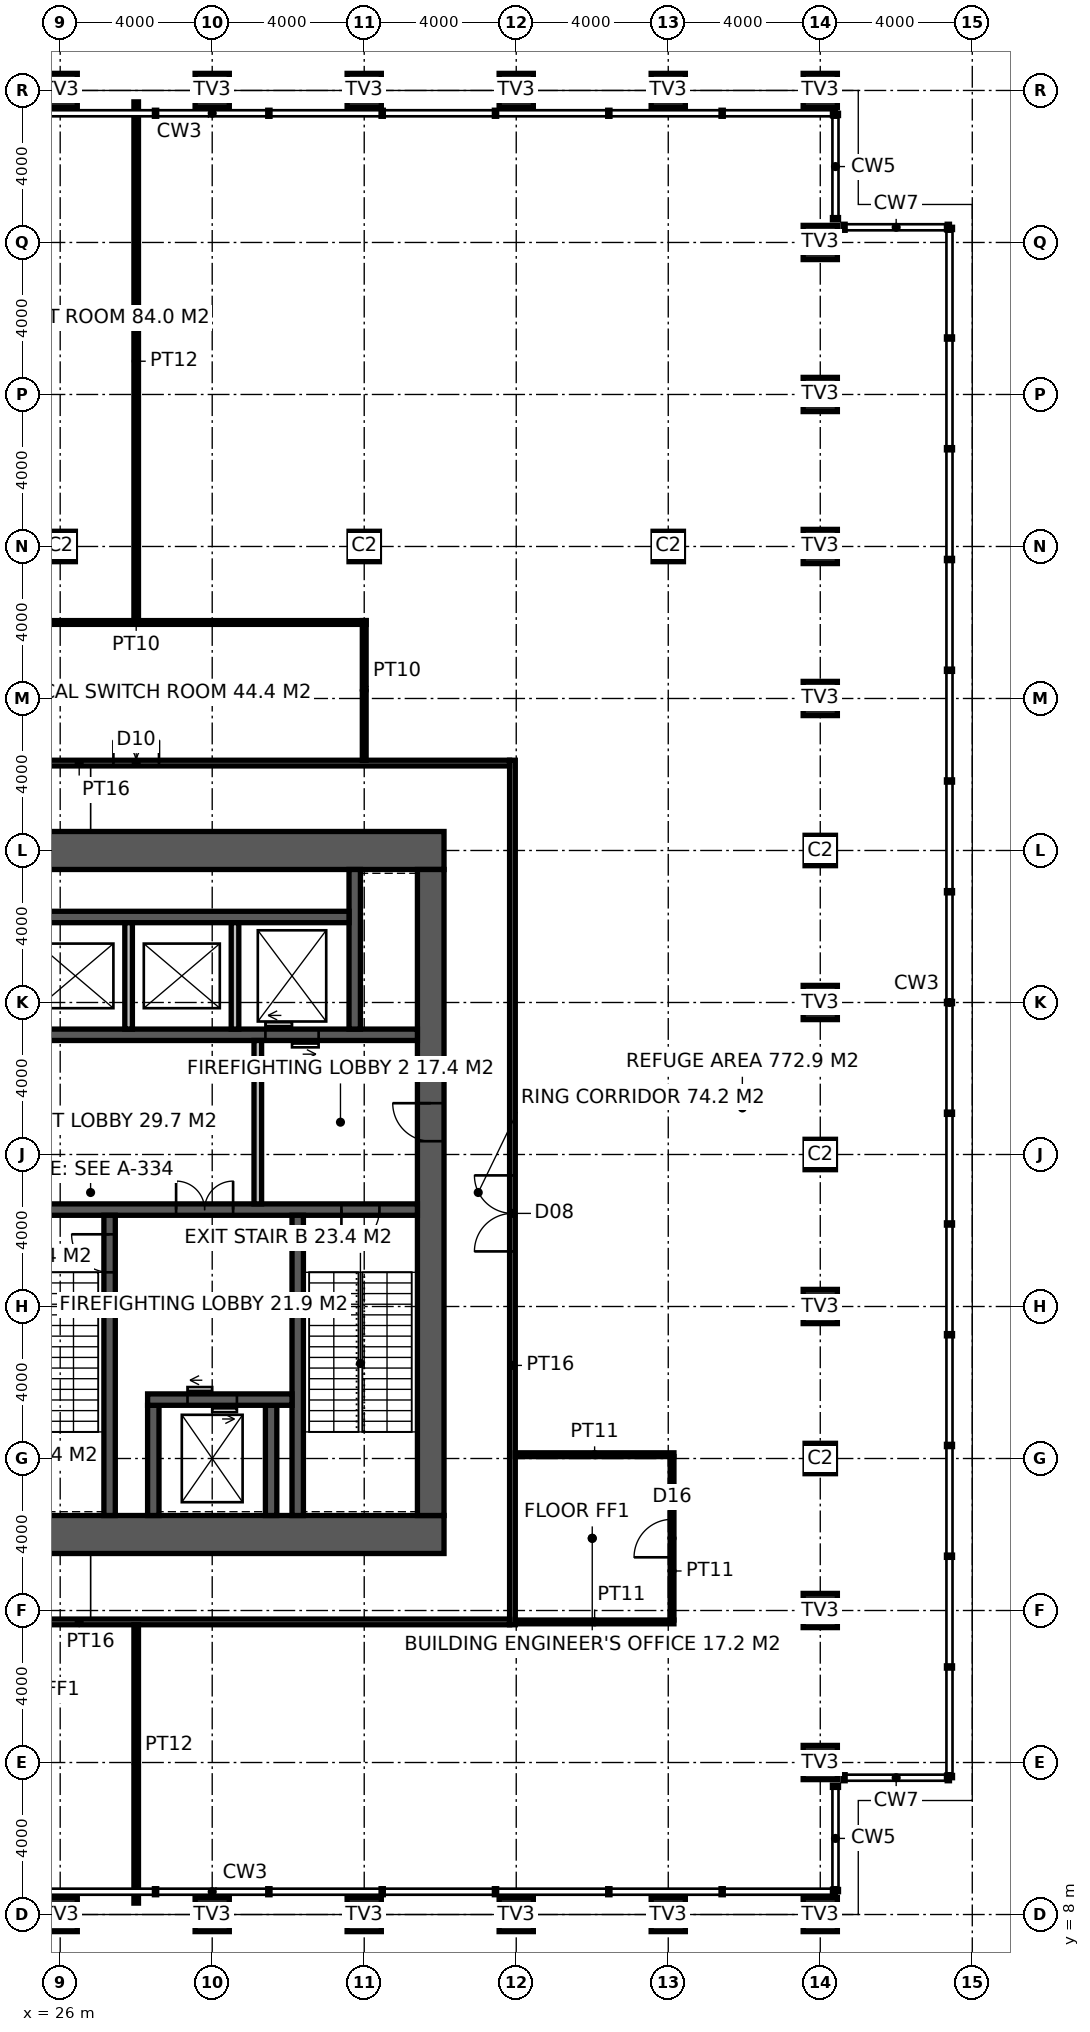
"""IFC4 building model, lengths in metres.
Left out: names, types, materials, properties, quantities, classifications, styles, units other than length and angle.
Written with IfcOpenShell. Run it as: python <this file> out.ifc"""

import sys

from ifc_helpers import new_model, si_unit, direction, frame, frame_2d, origin, origin_2d, place, context, subcontext, project, spatial, rectangle, hollow_rectangle, extrude, element, fill, save


model = new_model("IFC4")
c1 = context("Model", 3, precision=1e-05, world=origin(), true_north=direction((0.0, 1.0)))
c2 = subcontext(c1, "Body", "Model", "MODEL_VIEW")
j1 = project(units=[si_unit("LENGTHUNIT", "METRE"), si_unit("PLANEANGLEUNIT", "RADIAN")], contexts=[c1])
p1 = place(None, origin())
s1 = spatial("IfcSite", under=j1, at=p1, CompositionType="ELEMENT")
p2 = place(p1, origin())
s2 = spatial("IfcBuilding", under=s1, at=p2, CompositionType="ELEMENT")
p3 = place(p2, frame((0.0, 0.0, 203.8)))
s3 = spatial("IfcBuildingStorey", under=s2, at=p3, CompositionType="ELEMENT", Elevation=203.8)
for number, where, z_axis, x_axis in (
    (1, (26.0, 8.0, 0.0), (0.0, 0.0, 1.0), (1.0, 0.0, 0.0)),
    (2, (26.0, 56.0, 0.0), (0.0, 0.0, 1.0), (1.0, 0.0, 0.0)),
    (3, (30.0, 8.0, 0.0), (0.0, 0.0, 1.0), (1.0, 0.0, 0.0)),
    (4, (30.0, 56.0, 0.0), (0.0, 0.0, 1.0), (1.0, 0.0, 0.0)),
    (5, (34.0, 8.0, 0.0), (0.0, 0.0, 1.0), (1.0, 0.0, 0.0)),
    (6, (34.0, 56.0, 0.0), (0.0, 0.0, 1.0), (1.0, 0.0, 0.0)),
    (7, (38.0, 8.0, 0.0), (0.0, 0.0, 1.0), (1.0, 0.0, 0.0)),
    (8, (38.0, 56.0, 0.0), (0.0, 0.0, 1.0), (1.0, 0.0, 0.0)),
    (9, (42.0, 8.0, 0.0), (0.0, 0.0, 1.0), (1.0, 0.0, 0.0)),
    (10, (42.0, 56.0, 0.0), (0.0, 0.0, 1.0), (1.0, 0.0, 0.0)),
    (11, (46.0, 8.0, 0.0), (0.0, 0.0, 1.0), (1.0, 0.0, 0.0)),
    (12, (46.0, 56.0, 0.0), (0.0, 0.0, 1.0), (1.0, 0.0, 0.0)),
    (13, (46.0, 12.0, 0.0), (0.0, 0.0, 1.0), (1.0, 0.0, 0.0)),
    (14, (46.0, 16.0, 0.0), (0.0, 0.0, 1.0), (1.0, 0.0, 0.0)),
    (15, (46.0, 24.0, 0.0), (0.0, 0.0, 1.0), (1.0, 0.0, 0.0)),
    (16, (46.0, 32.0, 0.0), (0.0, 0.0, 1.0), (1.0, 0.0, 0.0)),
    (17, (46.0, 40.0, 0.0), (0.0, 0.0, 1.0), (1.0, 0.0, 0.0)),
    (18, (46.0, 44.0, 0.0), (0.0, 0.0, 1.0), (1.0, 0.0, 0.0)),
    (19, (46.0, 48.0, 0.0), (0.0, 0.0, 1.0), (1.0, 0.0, 0.0)),
    (20, (46.0, 52.0, 0.0), (0.0, 0.0, 1.0), (1.0, 0.0, 0.0)),
):
    element("IfcColumn", number, at=place(p3, frame(where, z_axis=z_axis, x_axis=x_axis)), inside=s3, PredefinedType="USERDEFINED", context=c2, shape_type="SweptSolid", body=[
        extrude(hollow_rectangle(XDim=0.9, YDim=0.9, WallThickness=0.08, at=origin_2d()), origin(), (0.0, 0.0, 1.0), 5.4),
    ])
for number, where, z_axis, x_axis in (
    (21, (26.0, 44.0, 0.0), (0.0, 0.0, 1.0), (1.0, 0.0, 0.0)),
    (22, (34.0, 44.0, 0.0), (0.0, 0.0, 1.0), (1.0, 0.0, 0.0)),
    (23, (42.0, 44.0, 0.0), (0.0, 0.0, 1.0), (1.0, 0.0, 0.0)),
    (24, (46.0, 20.0, 0.0), (0.0, 0.0, 1.0), (1.0, 0.0, 0.0)),
    (25, (46.0, 28.0, 0.0), (0.0, 0.0, 1.0), (1.0, 0.0, 0.0)),
    (26, (46.0, 36.0, 0.0), (0.0, 0.0, 1.0), (1.0, 0.0, 0.0)),
):
    element("IfcColumn", number, at=place(p3, frame(where, z_axis=z_axis, x_axis=x_axis)), inside=s3, PredefinedType="COLUMN", context=c2, shape_type="SweptSolid", body=[
        extrude(hollow_rectangle(XDim=0.8, YDim=0.8, WallThickness=0.08, at=origin_2d()), origin(), (0.0, 0.0, 1.0), 5.4),
    ])
p4 = place(p3, frame((18.5, 18.0, -0.15), z_axis=(0.0, 0.0, 1.0), x_axis=(1.0, 0.0, 0.0)))
e27 = element("IfcWall", 27, at=p4, inside=s3, PredefinedType="SHEAR", context=c2, shape_type="SweptSolid", body=[
    extrude(rectangle(XDim=17.6, YDim=1.0, at=frame_2d((8.8, 0.0))), origin(), (0.0, 0.0, 1.0), 5.4),
])
p5 = place(p4, frame((3.45, 0.0, 0.15)))
e28 = element("IfcOpeningElement", 28, at=p5, cuts=e27, PredefinedType="OPENING", context=c2, shape_type="SweptSolid", body=[
    extrude(rectangle(XDim=1.5, YDim=2.4, at=frame_2d((0.75, 1.2))), frame((0.0, 0.51, 0.0), z_axis=(0.0, -1.0, 0.0), x_axis=(1.0, 0.0, 0.0)), (0.0, 0.0, 1.0), 1.02),
])
p6 = place(p3, frame((18.5, 36.0, -0.15), z_axis=(0.0, 0.0, 1.0), x_axis=(1.0, 0.0, 0.0)))
e29 = element("IfcWall", 29, at=p6, inside=s3, PredefinedType="SHEAR", context=c2, shape_type="SweptSolid", body=[
    extrude(rectangle(XDim=17.6, YDim=1.0, at=frame_2d((8.8, 0.0))), origin(), (0.0, 0.0, 1.0), 5.4),
])
p7 = place(p3, frame((35.75, 18.5, -0.15), z_axis=(0.0, 0.0, 1.0), x_axis=(0.0, 1.0, 0.0)))
e30 = element("IfcWall", 30, at=p7, inside=s3, PredefinedType="SHEAR", context=c2, shape_type="SweptSolid", body=[
    extrude(rectangle(XDim=17.0, YDim=0.7, at=frame_2d((8.5, 0.0))), origin(), (0.0, 0.0, 1.0), 5.4),
])
p8 = place(p7, frame((9.85, 0.0, 0.15)))
e31 = element("IfcOpeningElement", 31, at=p8, cuts=e30, PredefinedType="OPENING", context=c2, shape_type="SweptSolid", body=[
    extrude(rectangle(XDim=1.0, YDim=2.2, at=frame_2d((0.5, 1.1))), frame((0.0, 0.36, 0.0), z_axis=(0.0, -1.0, 0.0), x_axis=(1.0, 0.0, 0.0)), (0.0, 0.0, 1.0), 0.72),
])
p9 = place(p3, frame((24.15, 26.55, -0.15), z_axis=(0.0, 0.0, 1.0), x_axis=(1.0, 0.0, 0.0)))
e32 = element("IfcWall", 32, at=p9, inside=s3, PredefinedType="SHEAR", context=c2, shape_type="SweptSolid", body=[
    extrude(rectangle(XDim=11.25, YDim=0.3, at=frame_2d((5.625, 0.0))), origin(), (0.0, 0.0, 1.0), 5.4),
])
p10 = place(p9, frame((9.25, 0.0, 0.15)))
e33 = element("IfcOpeningElement", 33, at=p10, cuts=e32, PredefinedType="OPENING", context=c2, shape_type="SweptSolid", body=[
    extrude(rectangle(XDim=1.0, YDim=2.2, at=frame_2d((0.5, 1.1))), frame((0.0, 0.16, 0.0), z_axis=(0.0, -1.0, 0.0), x_axis=(1.0, 0.0, 0.0)), (0.0, 0.0, 1.0), 0.32),
])
p11 = place(p9, frame((4.9, 0.0, 0.15)))
e34 = element("IfcOpeningElement", 34, at=p11, cuts=e32, PredefinedType="OPENING", context=c2, shape_type="SweptSolid", body=[
    extrude(rectangle(XDim=1.5, YDim=2.4, at=frame_2d((0.75, 1.2))), frame((0.0, 0.16, 0.0), z_axis=(0.0, -1.0, 0.0), x_axis=(1.0, 0.0, 0.0)), (0.0, 0.0, 1.0), 0.32),
])
p12 = place(p3, frame((27.3, 18.5, -0.15), z_axis=(0.0, 0.0, 1.0), x_axis=(0.0, 1.0, 0.0)))
e35 = element("IfcWall", 35, at=p12, inside=s3, PredefinedType="SHEAR", context=c2, shape_type="SweptSolid", body=[
    extrude(rectangle(XDim=7.9, YDim=0.3, at=frame_2d((3.95, 0.0))), origin(), (0.0, 0.0, 1.0), 5.4),
])
p13 = place(p12, frame((6.4, 0.0, 0.15)))
e36 = element("IfcOpeningElement", 36, at=p13, cuts=e35, PredefinedType="OPENING", context=c2, shape_type="SweptSolid", body=[
    extrude(rectangle(XDim=1.0, YDim=2.2, at=frame_2d((0.5, 1.1))), frame((0.0, 0.16, 0.0), z_axis=(0.0, -1.0, 0.0), x_axis=(1.0, 0.0, 0.0)), (0.0, 0.0, 1.0), 0.32),
])
p14 = place(p3, frame((32.25, 18.5, -0.15), z_axis=(0.0, 0.0, 1.0), x_axis=(0.0, 1.0, 0.0)))
e37 = element("IfcWall", 37, at=p14, inside=s3, PredefinedType="SHEAR", context=c2, shape_type="SweptSolid", body=[
    extrude(rectangle(XDim=7.9, YDim=0.3, at=frame_2d((3.95, 0.0))), origin(), (0.0, 0.0, 1.0), 5.4),
])
for number, where, z_axis, x_axis in (
    (38, (28.45, 18.5, -0.15), (0.0, 0.0, 1.0), (0.0, 1.0, 0.0)),
    (39, (31.55, 18.5, -0.15), (0.0, 0.0, 1.0), (0.0, 1.0, 0.0)),
):
    element("IfcWall", number, at=place(p3, frame(where, z_axis=z_axis, x_axis=x_axis)), inside=s3, PredefinedType="SHEAR", context=c2, shape_type="SweptSolid", body=[
        extrude(rectangle(XDim=2.9, YDim=0.3, at=frame_2d((1.45, 0.0))), origin(), (0.0, 0.0, 1.0), 5.4),
    ])
p15 = place(p3, frame((28.3, 21.55, -0.15), z_axis=(0.0, 0.0, 1.0), x_axis=(1.0, 0.0, 0.0)))
e40 = element("IfcWall", 40, at=p15, inside=s3, PredefinedType="SHEAR", context=c2, shape_type="SweptSolid", body=[
    extrude(rectangle(XDim=3.8, YDim=0.3, at=frame_2d((1.9, 0.0))), origin(), (0.0, 0.0, 1.0), 5.4),
])
p16 = place(p15, frame((1.05, 0.0, 0.15)))
e41 = element("IfcOpeningElement", 41, at=p16, cuts=e40, PredefinedType="OPENING", context=c2, shape_type="SweptSolid", body=[
    extrude(rectangle(XDim=1.3, YDim=2.4, at=frame_2d((0.65, 1.2))), frame((0.0, 0.16, 0.0), z_axis=(0.0, -1.0, 0.0), x_axis=(1.0, 0.0, 0.0)), (0.0, 0.0, 1.0), 0.32),
])
p17 = place(p3, frame((24.15, 31.15, -0.15), z_axis=(0.0, 0.0, 1.0), x_axis=(1.0, 0.0, 0.0)))
e42 = element("IfcWall", 42, at=p17, inside=s3, PredefinedType="SHEAR", context=c2, shape_type="SweptSolid", body=[
    extrude(rectangle(XDim=11.25, YDim=0.3, at=frame_2d((5.625, 0.0))), origin(), (0.0, 0.0, 1.0), 5.4),
])
p18 = place(p17, frame((7.25, 0.0, 0.15)))
e43 = element("IfcOpeningElement", 43, at=p18, cuts=e42, PredefinedType="OPENING", context=c2, shape_type="SweptSolid", body=[
    extrude(rectangle(XDim=1.4, YDim=2.4, at=frame_2d((0.7, 1.2))), frame((0.0, 0.16, 0.0), z_axis=(0.0, -1.0, 0.0), x_axis=(1.0, 0.0, 0.0)), (0.0, 0.0, 1.0), 0.32),
])
p19 = place(p3, frame((33.75, 31.3, -0.15), z_axis=(0.0, 0.0, 1.0), x_axis=(0.0, 1.0, 0.0)))
e44 = element("IfcWall", 44, at=p19, inside=s3, PredefinedType="SHEAR", context=c2, shape_type="SweptSolid", body=[
    extrude(rectangle(XDim=4.2, YDim=0.3, at=frame_2d((2.1, 0.0))), origin(), (0.0, 0.0, 1.0), 5.4),
])
p20 = place(p3, frame((25.0, 34.25, -0.15), z_axis=(0.0, 0.0, 1.0), x_axis=(1.0, 0.0, 0.0)))
e45 = element("IfcWall", 45, at=p20, inside=s3, PredefinedType="SHEAR", context=c2, shape_type="SweptSolid", body=[
    extrude(rectangle(XDim=8.6, YDim=0.3, at=frame_2d((4.3, 0.0))), origin(), (0.0, 0.0, 1.0), 5.4),
])
for number, where, z_axis, x_axis in (
    (46, (27.8, 31.3, -0.15), (0.0, 0.0, 1.0), (0.0, 1.0, 0.0)),
    (47, (30.6, 31.3, -0.15), (0.0, 0.0, 1.0), (0.0, 1.0, 0.0)),
):
    element("IfcWall", number, at=place(p3, frame(where, z_axis=z_axis, x_axis=x_axis)), inside=s3, PredefinedType="SOLIDWALL", context=c2, shape_type="SweptSolid", body=[
        extrude(rectangle(XDim=2.8, YDim=0.2, at=frame_2d((1.4, 0.0))), origin(), (0.0, 0.0, 1.0), 5.4),
    ])
p21 = place(p3, frame((31.2, 26.7, 0.0), z_axis=(0.0, 0.0, 1.0), x_axis=(0.0, 1.0, 0.0)))
e48 = element("IfcWall", 48, at=p21, inside=s3, PredefinedType="SOLIDWALL", context=c2, shape_type="SweptSolid", body=[
    extrude(rectangle(XDim=4.3, YDim=0.2, at=frame_2d((2.15, 0.0))), origin(), (0.0, 0.0, 1.0), 5.25),
])
p22 = place(p3, frame((37.9, 15.625, 0.0), z_axis=(0.0, 0.0, 1.0), x_axis=(0.0, 1.0, 0.0)))
e49 = element("IfcWall", 49, at=p22, inside=s3, PredefinedType="PARTITIONING", context=c2, shape_type="SweptSolid", body=[
    extrude(rectangle(XDim=22.75, YDim=0.15, at=frame_2d((11.375, 0.0))), origin(), (0.0, 0.0, 1.0), 4.25),
])
p23 = place(p22, frame((9.825, 0.0, 0.0)))
e50 = element("IfcOpeningElement", 50, at=p23, cuts=e49, PredefinedType="OPENING", context=c2, shape_type="SweptSolid", body=[
    extrude(rectangle(XDim=2.0, YDim=2.4, at=frame_2d((1.0, 1.2))), frame((0.0, 0.085, 0.0), z_axis=(0.0, -1.0, 0.0), x_axis=(1.0, 0.0, 0.0)), (0.0, 0.0, 1.0), 0.17),
])
p24 = place(p3, frame((15.175, 15.7, 0.0), z_axis=(0.0, 0.0, 1.0), x_axis=(1.0, 0.0, 0.0)))
e51 = element("IfcWall", 51, at=p24, inside=s3, PredefinedType="PARTITIONING", context=c2, shape_type="SweptSolid", body=[
    extrude(rectangle(XDim=22.65, YDim=0.15, at=frame_2d((11.325, 0.0))), origin(), (0.0, 0.0, 1.0), 5.25),
])
p25 = place(p3, frame((15.175, 38.3, 0.0), z_axis=(0.0, 0.0, 1.0), x_axis=(1.0, 0.0, 0.0)))
e52 = element("IfcWall", 52, at=p25, inside=s3, PredefinedType="PARTITIONING", context=c2, shape_type="SweptSolid", body=[
    extrude(rectangle(XDim=22.65, YDim=0.15, at=frame_2d((11.325, 0.0))), origin(), (0.0, 0.0, 1.0), 5.25),
])
p26 = place(p25, frame((12.225, 0.0, 0.0)))
e53 = element("IfcOpeningElement", 53, at=p26, cuts=e52, PredefinedType="OPENING", context=c2, shape_type="SweptSolid", body=[
    extrude(rectangle(XDim=1.2, YDim=2.2, at=frame_2d((0.6, 1.1))), frame((0.0, 0.085, 0.0), z_axis=(0.0, -1.0, 0.0), x_axis=(1.0, 0.0, 0.0)), (0.0, 0.0, 1.0), 0.17),
])
p27 = place(p3, frame((34.0, 38.375, 0.0), z_axis=(0.0, 0.0, 1.0), x_axis=(0.0, 1.0, 0.0)))
e54 = element("IfcWall", 54, at=p27, inside=s3, PredefinedType="PARTITIONING", context=c2, shape_type="SweptSolid", body=[
    extrude(rectangle(XDim=3.675, YDim=0.1, at=frame_2d((1.837, 0.0))), origin(), (0.0, 0.0, 1.0), 4.25),
])
p28 = place(p3, frame((21.95, 42.0, 0.0), z_axis=(0.0, 0.0, 1.0), x_axis=(1.0, 0.0, 0.0)))
e55 = element("IfcWall", 55, at=p28, inside=s3, PredefinedType="PARTITIONING", context=c2, shape_type="SweptSolid", body=[
    extrude(rectangle(XDim=12.1, YDim=0.1, at=frame_2d((6.05, 0.0))), origin(), (0.0, 0.0, 1.0), 5.25),
])
p29 = place(p3, frame((28.0, 8.3, 0.0), z_axis=(0.0, 0.0, 1.0), x_axis=(0.0, 1.0, 0.0)))
e56 = element("IfcWall", 56, at=p29, inside=s3, PredefinedType="PARTITIONING", context=c2, shape_type="SweptSolid", body=[
    extrude(rectangle(XDim=7.325, YDim=0.12, at=frame_2d((3.663, 0.0))), origin(), (0.0, 0.0, 1.0), 5.25),
])
p30 = place(p3, frame((28.0, 42.05, 0.0), z_axis=(0.0, 0.0, 1.0), x_axis=(0.0, 1.0, 0.0)))
e57 = element("IfcWall", 57, at=p30, inside=s3, PredefinedType="PARTITIONING", context=c2, shape_type="SweptSolid", body=[
    extrude(rectangle(XDim=13.65, YDim=0.12, at=frame_2d((6.825, 0.0))), origin(), (0.0, 0.0, 1.0), 5.25),
])
p31 = place(p3, frame((37.975, 15.7, 0.0), z_axis=(0.0, 0.0, 1.0), x_axis=(1.0, 0.0, 0.0)))
e58 = element("IfcWall", 58, at=p31, inside=s3, PredefinedType="PARTITIONING", context=c2, shape_type="SweptSolid", body=[
    extrude(rectangle(XDim=4.175, YDim=0.1, at=frame_2d((2.087, 0.0))), origin(), (0.0, 0.0, 1.0), 5.25),
])
p32 = place(p3, frame((37.975, 20.1, 0.0), z_axis=(0.0, 0.0, 1.0), x_axis=(1.0, 0.0, 0.0)))
e59 = element("IfcWall", 59, at=p32, inside=s3, PredefinedType="PARTITIONING", context=c2, shape_type="SweptSolid", body=[
    extrude(rectangle(XDim=4.175, YDim=0.1, at=frame_2d((2.087, 0.0))), origin(), (0.0, 0.0, 1.0), 4.35),
])
p33 = place(p3, frame((42.1, 15.75, 0.0), z_axis=(0.0, 0.0, 1.0), x_axis=(0.0, 1.0, 0.0)))
e60 = element("IfcWall", 60, at=p33, inside=s3, PredefinedType="PARTITIONING", context=c2, shape_type="SweptSolid", body=[
    extrude(rectangle(XDim=4.3, YDim=0.1, at=frame_2d((2.15, 0.0))), origin(), (0.0, 0.0, 1.0), 4.35),
])
p34 = place(p33, frame((1.65, 0.0, 0.0)))
e61 = element("IfcOpeningElement", 61, at=p34, cuts=e60, PredefinedType="OPENING", context=c2, shape_type="SweptSolid", body=[
    extrude(rectangle(XDim=1.0, YDim=2.2, at=frame_2d((0.5, 1.1))), frame((0.0, 0.06, 0.0), z_axis=(0.0, -1.0, 0.0), x_axis=(1.0, 0.0, 0.0)), (0.0, 0.0, 1.0), 0.12),
])
p35 = place(p13, origin())
e62 = element("IfcDoor", 62, at=p35, inside=s3, OperationType="SINGLE_SWING_RIGHT", PredefinedType="DOOR", context=c2, shape_type="SweptSolid", body=[
    extrude(rectangle(XDim=1.0, YDim=2.2, at=frame_2d((0.5, 1.1))), frame((0.0, 0.025, 0.0), z_axis=(0.0, -1.0, 0.0), x_axis=(1.0, 0.0, 0.0)), (0.0, 0.0, 1.0), 0.05),
])
fill(e36, e62)
p36 = place(p10, frame((1.0, 0.0, 0.0), z_axis=(0.0, 0.0, 1.0), x_axis=(-1.0, 0.0, 0.0)))
e63 = element("IfcDoor", 63, at=p36, inside=s3, OperationType="SINGLE_SWING_RIGHT", PredefinedType="DOOR", context=c2, shape_type="SweptSolid", body=[
    extrude(rectangle(XDim=1.0, YDim=2.2, at=frame_2d((0.5, 1.1))), frame((0.0, 0.025, 0.0), z_axis=(0.0, -1.0, 0.0), x_axis=(1.0, 0.0, 0.0)), (0.0, 0.0, 1.0), 0.05),
])
fill(e33, e63)
p37 = place(p8, origin())
e64 = element("IfcDoor", 64, at=p37, inside=s3, OperationType="SINGLE_SWING_RIGHT", PredefinedType="DOOR", context=c2, shape_type="SweptSolid", body=[
    extrude(rectangle(XDim=1.0, YDim=2.2, at=frame_2d((0.5, 1.1))), frame((0.0, 0.025, 0.0), z_axis=(0.0, -1.0, 0.0), x_axis=(1.0, 0.0, 0.0)), (0.0, 0.0, 1.0), 0.05),
])
fill(e31, e64)
p38 = place(p11, origin())
e65 = element("IfcDoor", 65, at=p38, inside=s3, OperationType="DOUBLE_DOOR_DOUBLE_SWING", PredefinedType="DOOR", context=c2, shape_type="SweptSolid", body=[
    extrude(rectangle(XDim=1.5, YDim=2.4, at=frame_2d((0.75, 1.2))), frame((0.0, 0.025, 0.0), z_axis=(0.0, -1.0, 0.0), x_axis=(1.0, 0.0, 0.0)), (0.0, 0.0, 1.0), 0.05),
])
fill(e34, e65)
p39 = place(p26, origin())
e66 = element("IfcDoor", 66, at=p39, inside=s3, OperationType="DOUBLE_DOOR_DOUBLE_SWING", PredefinedType="DOOR", context=c2, shape_type="SweptSolid", body=[
    extrude(rectangle(XDim=1.2, YDim=2.2, at=frame_2d((0.6, 1.1))), frame((0.0, 0.025, 0.0), z_axis=(0.0, -1.0, 0.0), x_axis=(1.0, 0.0, 0.0)), (0.0, 0.0, 1.0), 0.05),
])
fill(e53, e66)
p40 = place(p23, origin())
e67 = element("IfcDoor", 67, at=p40, inside=s3, OperationType="DOUBLE_DOOR_DOUBLE_SWING", PredefinedType="DOOR", context=c2, shape_type="SweptSolid", body=[
    extrude(rectangle(XDim=2.0, YDim=2.4, at=frame_2d((1.0, 1.2))), frame((0.0, 0.025, 0.0), z_axis=(0.0, -1.0, 0.0), x_axis=(1.0, 0.0, 0.0)), (0.0, 0.0, 1.0), 0.05),
])
fill(e50, e67)
p41 = place(p34, origin())
e68 = element("IfcDoor", 68, at=p41, inside=s3, OperationType="SINGLE_SWING_LEFT", PredefinedType="DOOR", context=c2, shape_type="SweptSolid", body=[
    extrude(rectangle(XDim=1.0, YDim=2.2, at=frame_2d((0.5, 1.1))), frame((0.0, 0.025, 0.0), z_axis=(0.0, -1.0, 0.0), x_axis=(1.0, 0.0, 0.0)), (0.0, 0.0, 1.0), 0.05),
])
fill(e61, e68)
p42 = place(p16, origin())
e69 = element("IfcDoor", 69, at=p42, inside=s3, OperationType="DOUBLE_DOOR_SLIDING", PredefinedType="DOOR", context=c2, shape_type="SweptSolid", body=[
    extrude(rectangle(XDim=1.3, YDim=2.4, at=frame_2d((0.65, 1.2))), frame((0.0, 0.025, 0.0), z_axis=(0.0, -1.0, 0.0), x_axis=(1.0, 0.0, 0.0)), (0.0, 0.0, 1.0), 0.05),
])
fill(e41, e69)
p43 = place(p18, origin())
e70 = element("IfcDoor", 70, at=p43, inside=s3, OperationType="DOUBLE_DOOR_SLIDING", PredefinedType="DOOR", context=c2, shape_type="SweptSolid", body=[
    extrude(rectangle(XDim=1.4, YDim=2.4, at=frame_2d((0.7, 1.2))), frame((0.0, 0.025, 0.0), z_axis=(0.0, -1.0, 0.0), x_axis=(1.0, 0.0, 0.0)), (0.0, 0.0, 1.0), 0.05),
])
fill(e43, e70)
save(model, sys.argv[1])
